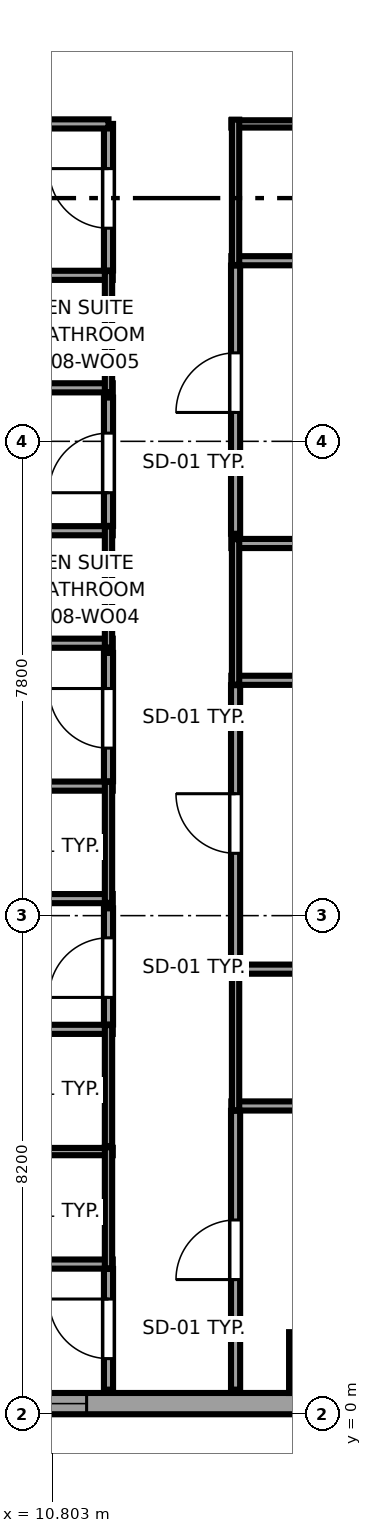
"""IFC4 building model, lengths in metres.
Left out: names, types, materials, properties, quantities, classifications, styles, units other than length and angle.
Written with IfcOpenShell. Run it as: python <this file> out.ifc"""

import sys

from ifc_helpers import new_model, si_unit, direction, frame, frame_2d, origin, origin_2d, place, context, subcontext, project, spatial, rectangle, extrude, source, transform, mapped, element, fill, save


model = new_model("IFC4")
c1 = context("Model", 3, precision=1e-05, world=origin(), true_north=direction((0.0, 1.0)))
c2 = subcontext(c1, "Body", "Model", "MODEL_VIEW")
j1 = project(units=[si_unit("LENGTHUNIT", "METRE"), si_unit("PLANEANGLEUNIT", "RADIAN")], contexts=[c1])
p1 = place(None, origin())
s1 = spatial("IfcSite", under=j1, at=p1, CompositionType="ELEMENT")
p2 = place(p1, origin())
s2 = spatial("IfcBuilding", under=s1, at=p2, CompositionType="ELEMENT")
p3 = place(p2, frame((0.0, 0.0, 39.1)))
s3 = spatial("IfcBuildingStorey", under=s2, at=p3, CompositionType="ELEMENT", Elevation=39.1)
m1 = source(origin(), c2, "Body", "SweptSolid", [
    extrude(rectangle(XDim=1.0, YDim=1.0, at=origin_2d()), origin(), (0.0, 0.0, 1.0), 3.55),
])
p4 = place(p3, frame((15.2, 0.85, 0.0), z_axis=(0.0, 0.0, 1.0), x_axis=(1.0, 0.0, 0.0)))
e1 = element("IfcColumn", 1, at=p4, inside=s3, PredefinedType="COLUMN", context=c2, shape_type="MappedRepresentation", body=[
    mapped(m1, transform((0.0, 0.0, 0.0), x_axis=(1.0, 0.0, 0.0), y_axis=(0.0, 1.0, 0.0), z_axis=(0.0, 0.0, 1.0), scale=1.0)),
])
p5 = place(p3, frame((4.617, 0.175, 0.0), z_axis=(0.0, 0.0, 1.0), x_axis=(1.0, 0.0, 0.0)))
e2 = element("IfcWall", 2, at=p5, inside=s3, PredefinedType="SOLIDWALL", context=c2, shape_type="SweptSolid", body=[
    extrude(rectangle(XDim=18.008, YDim=0.35, at=frame_2d((9.004, 0.0))), origin(), (0.0, 0.0, 1.0), 3.37),
])
p6 = place(p5, frame((4.953, 0.0, 0.68)))
e3 = element("IfcOpeningElement", 3, at=p6, cuts=e2, PredefinedType="OPENING", context=c2, shape_type="SweptSolid", body=[
    extrude(rectangle(XDim=1.8, YDim=1.85, at=frame_2d((0.9, 0.925))), frame((0.0, 0.185, 0.0), z_axis=(0.0, -1.0, 0.0), x_axis=(1.0, 0.0, 0.0)), (0.0, 0.0, 1.0), 0.37),
])
p7 = place(p5, frame((14.407, 0.0, 0.68)))
e4 = element("IfcOpeningElement", 4, at=p7, cuts=e2, PredefinedType="OPENING", context=c2, shape_type="SweptSolid", body=[
    extrude(rectangle(XDim=1.8, YDim=1.85, at=frame_2d((0.9, 0.925))), frame((0.0, 0.185, 0.0), z_axis=(0.0, -1.0, 0.0), x_axis=(1.0, 0.0, 0.0)), (0.0, 0.0, 1.0), 0.37),
])
p8 = place(p3, frame((9.21, 2.47, 0.0), z_axis=(0.0, 0.0, 1.0), x_axis=(1.0, 0.0, 0.0)))
e5 = element("IfcWall", 5, at=p8, inside=s3, PredefinedType="PARTITIONING", context=c2, shape_type="SweptSolid", body=[
    extrude(rectangle(XDim=2.59, YDim=0.15, at=frame_2d((1.295, 0.0))), origin(), (0.0, 0.0, 1.0), 3.37),
])
p9 = place(p3, frame((9.21, 4.32, 0.0), z_axis=(0.0, 0.0, 1.0), x_axis=(1.0, 0.0, 0.0)))
e6 = element("IfcWall", 6, at=p9, inside=s3, PredefinedType="PLUMBINGWALL", context=c2, shape_type="SweptSolid", body=[
    extrude(rectangle(XDim=2.59, YDim=0.12, at=frame_2d((1.295, 0.0))), origin(), (0.0, 0.0, 1.0), 3.37),
])
p10 = place(p3, frame((11.73, 2.4, 0.0), z_axis=(0.0, 0.0, 1.0), x_axis=(0.0, 1.0, 0.0)))
e7 = element("IfcWall", 7, at=p10, inside=s3, PredefinedType="PLUMBINGWALL", context=c2, shape_type="SweptSolid", body=[
    extrude(rectangle(XDim=1.99, YDim=0.12, at=frame_2d((0.995, 0.0))), origin(), (0.0, 0.0, 1.0), 3.37),
])
p11 = place(p3, frame((9.21, 6.33, 0.0), z_axis=(0.0, 0.0, 1.0), x_axis=(1.0, 0.0, 0.0)))
e8 = element("IfcWall", 8, at=p11, inside=s3, PredefinedType="PARTITIONING", context=c2, shape_type="SweptSolid", body=[
    extrude(rectangle(XDim=2.59, YDim=0.15, at=frame_2d((1.295, 0.0))), origin(), (0.0, 0.0, 1.0), 3.37),
])
p12 = place(p3, frame((11.73, 4.41, 0.0), z_axis=(0.0, 0.0, 1.0), x_axis=(0.0, 1.0, 0.0)))
e9 = element("IfcWall", 9, at=p12, inside=s3, PredefinedType="PLUMBINGWALL", context=c2, shape_type="SweptSolid", body=[
    extrude(rectangle(XDim=1.99, YDim=0.12, at=frame_2d((0.995, 0.0))), origin(), (0.0, 0.0, 1.0), 3.37),
])
p13 = place(p3, frame((0.405, 8.48, 0.0), z_axis=(0.0, 0.0, 1.0), x_axis=(1.0, 0.0, 0.0)))
e10 = element("IfcWall", 10, at=p13, inside=s3, PredefinedType="PARTITIONING", context=c2, shape_type="SweptSolid", body=[
    extrude(rectangle(XDim=11.395, YDim=0.15, at=frame_2d((5.698, 0.0))), origin(), (0.0, 0.0, 1.0), 3.37),
])
p14 = place(p3, frame((9.21, 10.33, 0.0), z_axis=(0.0, 0.0, 1.0), x_axis=(1.0, 0.0, 0.0)))
e11 = element("IfcWall", 11, at=p14, inside=s3, PredefinedType="PARTITIONING", context=c2, shape_type="SweptSolid", body=[
    extrude(rectangle(XDim=2.59, YDim=0.15, at=frame_2d((1.295, 0.0))), origin(), (0.0, 0.0, 1.0), 3.37),
])
p15 = place(p3, frame((11.73, 8.41, 0.0), z_axis=(0.0, 0.0, 1.0), x_axis=(0.0, 1.0, 0.0)))
e12 = element("IfcWall", 12, at=p15, inside=s3, PredefinedType="PLUMBINGWALL", context=c2, shape_type="SweptSolid", body=[
    extrude(rectangle(XDim=1.99, YDim=0.12, at=frame_2d((0.995, 0.0))), origin(), (0.0, 0.0, 1.0), 3.37),
])
p16 = place(p3, frame((0.405, 12.68, 0.0), z_axis=(0.0, 0.0, 1.0), x_axis=(1.0, 0.0, 0.0)))
e13 = element("IfcWall", 13, at=p16, inside=s3, PredefinedType="PARTITIONING", context=c2, shape_type="SweptSolid", body=[
    extrude(rectangle(XDim=11.395, YDim=0.15, at=frame_2d((5.698, 0.0))), origin(), (0.0, 0.0, 1.0), 3.37),
])
p17 = place(p3, frame((9.21, 14.53, 0.0), z_axis=(0.0, 0.0, 1.0), x_axis=(1.0, 0.0, 0.0)))
e14 = element("IfcWall", 14, at=p17, inside=s3, PredefinedType="PARTITIONING", context=c2, shape_type="SweptSolid", body=[
    extrude(rectangle(XDim=2.59, YDim=0.15, at=frame_2d((1.295, 0.0))), origin(), (0.0, 0.0, 1.0), 3.37),
])
p18 = place(p3, frame((11.73, 12.61, 0.0), z_axis=(0.0, 0.0, 1.0), x_axis=(0.0, 1.0, 0.0)))
e15 = element("IfcWall", 15, at=p18, inside=s3, PredefinedType="PLUMBINGWALL", context=c2, shape_type="SweptSolid", body=[
    extrude(rectangle(XDim=1.99, YDim=0.12, at=frame_2d((0.995, 0.0))), origin(), (0.0, 0.0, 1.0), 3.37),
])
p19 = place(p3, frame((0.405, 16.88, 0.0), z_axis=(0.0, 0.0, 1.0), x_axis=(1.0, 0.0, 0.0)))
e16 = element("IfcWall", 16, at=p19, inside=s3, PredefinedType="PARTITIONING", context=c2, shape_type="SweptSolid", body=[
    extrude(rectangle(XDim=11.395, YDim=0.15, at=frame_2d((5.698, 0.0))), origin(), (0.0, 0.0, 1.0), 3.37),
])
p20 = place(p3, frame((9.21, 18.73, 0.0), z_axis=(0.0, 0.0, 1.0), x_axis=(1.0, 0.0, 0.0)))
e17 = element("IfcWall", 17, at=p20, inside=s3, PredefinedType="PARTITIONING", context=c2, shape_type="SweptSolid", body=[
    extrude(rectangle(XDim=2.59, YDim=0.15, at=frame_2d((1.295, 0.0))), origin(), (0.0, 0.0, 1.0), 3.37),
])
p21 = place(p3, frame((11.73, 16.81, 0.0), z_axis=(0.0, 0.0, 1.0), x_axis=(0.0, 1.0, 0.0)))
e18 = element("IfcWall", 18, at=p21, inside=s3, PredefinedType="PLUMBINGWALL", context=c2, shape_type="SweptSolid", body=[
    extrude(rectangle(XDim=1.99, YDim=0.12, at=frame_2d((0.995, 0.0))), origin(), (0.0, 0.0, 1.0), 3.37),
])
for number, where, z_axis, x_axis in (
    (19, (13.75, 5.07, 0.0), (0.0, 0.0, 1.0), (1.0, 0.0, 0.0)),
    (20, (13.75, 7.32, 0.0), (0.0, 0.0, 1.0), (1.0, 0.0, 0.0)),
):
    element("IfcWall", number, at=place(p3, frame(where, z_axis=z_axis, x_axis=x_axis)), inside=s3, PredefinedType="PARTITIONING", context=c2, shape_type="SweptSolid", body=[
        extrude(rectangle(XDim=2.59, YDim=0.15, at=frame_2d((1.295, 0.0))), origin(), (0.0, 0.0, 1.0), 3.37),
    ])
p22 = place(p3, frame((13.82, 5.0, 0.0), z_axis=(0.0, 0.0, 1.0), x_axis=(0.0, 1.0, 0.0)))
e21 = element("IfcWall", 21, at=p22, inside=s3, PredefinedType="PLUMBINGWALL", context=c2, shape_type="SweptSolid", body=[
    extrude(rectangle(XDim=2.39, YDim=0.12, at=frame_2d((1.195, 0.0))), origin(), (0.0, 0.0, 1.0), 3.37),
])
for number, where, z_axis, x_axis in (
    (22, (13.75, 12.07, 0.0), (0.0, 0.0, 1.0), (1.0, 0.0, 0.0)),
    (23, (13.75, 14.32, 0.0), (0.0, 0.0, 1.0), (1.0, 0.0, 0.0)),
):
    element("IfcWall", number, at=place(p3, frame(where, z_axis=z_axis, x_axis=x_axis)), inside=s3, PredefinedType="PARTITIONING", context=c2, shape_type="SweptSolid", body=[
        extrude(rectangle(XDim=2.59, YDim=0.15, at=frame_2d((1.295, 0.0))), origin(), (0.0, 0.0, 1.0), 3.37),
    ])
p23 = place(p3, frame((13.82, 12.0, 0.0), z_axis=(0.0, 0.0, 1.0), x_axis=(0.0, 1.0, 0.0)))
e24 = element("IfcWall", 24, at=p23, inside=s3, PredefinedType="PLUMBINGWALL", context=c2, shape_type="SweptSolid", body=[
    extrude(rectangle(XDim=2.39, YDim=0.12, at=frame_2d((1.195, 0.0))), origin(), (0.0, 0.0, 1.0), 3.37),
])
p24 = place(p3, frame((13.75, 18.97, 0.0), z_axis=(0.0, 0.0, 1.0), x_axis=(1.0, 0.0, 0.0)))
e25 = element("IfcWall", 25, at=p24, inside=s3, PredefinedType="PARTITIONING", context=c2, shape_type="SweptSolid", body=[
    extrude(rectangle(XDim=2.59, YDim=0.15, at=frame_2d((1.295, 0.0))), origin(), (0.0, 0.0, 1.0), 3.37),
])
p25 = place(p3, frame((13.75, 21.22, 0.0), z_axis=(0.0, 0.0, 1.0), x_axis=(1.0, 0.0, 0.0)))
e26 = element("IfcWall", 26, at=p25, inside=s3, PredefinedType="PLUMBINGWALL", context=c2, shape_type="SweptSolid", body=[
    extrude(rectangle(XDim=2.59, YDim=0.12, at=frame_2d((1.295, 0.0))), origin(), (0.0, 0.0, 1.0), 3.37),
])
p26 = place(p3, frame((13.82, 18.9, 0.0), z_axis=(0.0, 0.0, 1.0), x_axis=(0.0, 1.0, 0.0)))
e27 = element("IfcWall", 27, at=p26, inside=s3, PredefinedType="PLUMBINGWALL", context=c2, shape_type="SweptSolid", body=[
    extrude(rectangle(XDim=2.39, YDim=0.12, at=frame_2d((1.195, 0.0))), origin(), (0.0, 0.0, 1.0), 3.37),
])
p27 = place(p3, frame((11.73, 0.405, 0.0), z_axis=(0.0, 0.0, 1.0), x_axis=(0.0, 1.0, 0.0)))
e28 = element("IfcWall", 28, at=p27, inside=s3, PredefinedType="PARTITIONING", context=c2, shape_type="SweptSolid", body=[
    extrude(rectangle(XDim=1.985, YDim=0.15, at=frame_2d((0.992, 0.0))), origin(), (0.0, 0.0, 1.0), 3.37),
])
p28 = place(p27, frame((0.51, 0.0, 0.0)))
e29 = element("IfcOpeningElement", 29, at=p28, cuts=e28, PredefinedType="OPENING", context=c2, shape_type="SweptSolid", body=[
    extrude(rectangle(XDim=0.98, YDim=2.12, at=frame_2d((0.49, 1.06))), frame((0.0, 0.085, 0.0), z_axis=(0.0, -1.0, 0.0), x_axis=(1.0, 0.0, 0.0)), (0.0, 0.0, 1.0), 0.17),
])
p29 = place(p3, frame((11.73, 6.41, 0.0), z_axis=(0.0, 0.0, 1.0), x_axis=(0.0, 1.0, 0.0)))
e30 = element("IfcWall", 30, at=p29, inside=s3, PredefinedType="PARTITIONING", context=c2, shape_type="SweptSolid", body=[
    extrude(rectangle(XDim=1.91, YDim=0.15, at=frame_2d((0.955, 0.0))), origin(), (0.0, 0.0, 1.0), 3.37),
])
p30 = place(p29, frame((0.445, 0.0, 0.0)))
e31 = element("IfcOpeningElement", 31, at=p30, cuts=e30, PredefinedType="OPENING", context=c2, shape_type="SweptSolid", body=[
    extrude(rectangle(XDim=0.98, YDim=2.12, at=frame_2d((0.49, 1.06))), frame((0.0, 0.085, 0.0), z_axis=(0.0, -1.0, 0.0), x_axis=(1.0, 0.0, 0.0)), (0.0, 0.0, 1.0), 0.17),
])
p31 = place(p3, frame((11.73, 10.41, 0.0), z_axis=(0.0, 0.0, 1.0), x_axis=(0.0, 1.0, 0.0)))
e32 = element("IfcWall", 32, at=p31, inside=s3, PredefinedType="PARTITIONING", context=c2, shape_type="SweptSolid", body=[
    extrude(rectangle(XDim=2.11, YDim=0.15, at=frame_2d((1.055, 0.0))), origin(), (0.0, 0.0, 1.0), 3.37),
])
p32 = place(p31, frame((0.545, 0.0, 0.0)))
e33 = element("IfcOpeningElement", 33, at=p32, cuts=e32, PredefinedType="OPENING", context=c2, shape_type="SweptSolid", body=[
    extrude(rectangle(XDim=0.98, YDim=2.12, at=frame_2d((0.49, 1.06))), frame((0.0, 0.085, 0.0), z_axis=(0.0, -1.0, 0.0), x_axis=(1.0, 0.0, 0.0)), (0.0, 0.0, 1.0), 0.17),
])
p33 = place(p3, frame((11.73, 14.61, 0.0), z_axis=(0.0, 0.0, 1.0), x_axis=(0.0, 1.0, 0.0)))
e34 = element("IfcWall", 34, at=p33, inside=s3, PredefinedType="PARTITIONING", context=c2, shape_type="SweptSolid", body=[
    extrude(rectangle(XDim=2.11, YDim=0.15, at=frame_2d((1.055, 0.0))), origin(), (0.0, 0.0, 1.0), 3.37),
])
p34 = place(p33, frame((0.545, 0.0, 0.0)))
e35 = element("IfcOpeningElement", 35, at=p34, cuts=e34, PredefinedType="OPENING", context=c2, shape_type="SweptSolid", body=[
    extrude(rectangle(XDim=0.98, YDim=2.12, at=frame_2d((0.49, 1.06))), frame((0.0, 0.085, 0.0), z_axis=(0.0, -1.0, 0.0), x_axis=(1.0, 0.0, 0.0)), (0.0, 0.0, 1.0), 0.17),
])
p35 = place(p3, frame((11.73, 18.81, 0.0), z_axis=(0.0, 0.0, 1.0), x_axis=(0.0, 1.0, 0.0)))
e36 = element("IfcWall", 36, at=p35, inside=s3, PredefinedType="PARTITIONING", context=c2, shape_type="SweptSolid", body=[
    extrude(rectangle(XDim=2.41, YDim=0.15, at=frame_2d((1.205, 0.0))), origin(), (0.0, 0.0, 1.0), 3.37),
])
p36 = place(p35, frame((0.695, 0.0, 0.0)))
e37 = element("IfcOpeningElement", 37, at=p36, cuts=e36, PredefinedType="OPENING", context=c2, shape_type="SweptSolid", body=[
    extrude(rectangle(XDim=0.98, YDim=2.12, at=frame_2d((0.49, 1.06))), frame((0.0, 0.085, 0.0), z_axis=(0.0, -1.0, 0.0), x_axis=(1.0, 0.0, 0.0)), (0.0, 0.0, 1.0), 0.17),
])
p37 = place(p3, frame((0.405, 21.22, 0.0), z_axis=(0.0, 0.0, 1.0), x_axis=(1.0, 0.0, 0.0)))
e38 = element("IfcWall", 38, at=p37, inside=s3, PredefinedType="PARTITIONING", context=c2, shape_type="SweptSolid", body=[
    extrude(rectangle(XDim=11.325, YDim=0.15, at=frame_2d((5.663, 0.0))), origin(), (0.0, 0.0, 1.0), 3.37),
])
p38 = place(p3, frame((13.82, 0.405, 0.0), z_axis=(0.0, 0.0, 1.0), x_axis=(0.0, 1.0, 0.0)))
e39 = element("IfcWall", 39, at=p38, inside=s3, PredefinedType="PARTITIONING", context=c2, shape_type="SweptSolid", body=[
    extrude(rectangle(XDim=4.585, YDim=0.15, at=frame_2d((2.292, 0.0))), origin(), (0.0, 0.0, 1.0), 3.37),
])
p39 = place(p38, frame((1.81, 0.0, 0.0)))
e40 = element("IfcOpeningElement", 40, at=p39, cuts=e39, PredefinedType="OPENING", context=c2, shape_type="SweptSolid", body=[
    extrude(rectangle(XDim=0.98, YDim=2.12, at=frame_2d((0.49, 1.06))), frame((0.0, 0.085, 0.0), z_axis=(0.0, -1.0, 0.0), x_axis=(1.0, 0.0, 0.0)), (0.0, 0.0, 1.0), 0.17),
])
p40 = place(p3, frame((13.82, 7.48, 0.0), z_axis=(0.0, 0.0, 1.0), x_axis=(0.0, 1.0, 0.0)))
e41 = element("IfcWall", 41, at=p40, inside=s3, PredefinedType="PARTITIONING", context=c2, shape_type="SweptSolid", body=[
    extrude(rectangle(XDim=4.51, YDim=0.15, at=frame_2d((2.255, 0.0))), origin(), (0.0, 0.0, 1.0), 3.37),
])
p41 = place(p40, frame((1.745, 0.0, 0.0)))
e42 = element("IfcOpeningElement", 42, at=p41, cuts=e41, PredefinedType="OPENING", context=c2, shape_type="SweptSolid", body=[
    extrude(rectangle(XDim=0.98, YDim=2.12, at=frame_2d((0.49, 1.06))), frame((0.0, 0.085, 0.0), z_axis=(0.0, -1.0, 0.0), x_axis=(1.0, 0.0, 0.0)), (0.0, 0.0, 1.0), 0.17),
])
p42 = place(p3, frame((13.82, 14.48, 0.0), z_axis=(0.0, 0.0, 1.0), x_axis=(0.0, 1.0, 0.0)))
e43 = element("IfcWall", 43, at=p42, inside=s3, PredefinedType="PARTITIONING", context=c2, shape_type="SweptSolid", body=[
    extrude(rectangle(XDim=4.41, YDim=0.15, at=frame_2d((2.205, 0.0))), origin(), (0.0, 0.0, 1.0), 3.37),
])
p43 = place(p42, frame((1.995, 0.0, 0.0)))
e44 = element("IfcOpeningElement", 44, at=p43, cuts=e43, PredefinedType="OPENING", context=c2, shape_type="SweptSolid", body=[
    extrude(rectangle(XDim=0.98, YDim=2.12, at=frame_2d((0.49, 1.06))), frame((0.0, 0.085, 0.0), z_axis=(0.0, -1.0, 0.0), x_axis=(1.0, 0.0, 0.0)), (0.0, 0.0, 1.0), 0.17),
])
m2 = source(origin(), c2, "Body", "SweptSolid", [
    extrude(rectangle(XDim=1.8, YDim=1.85, at=frame_2d((0.9, 0.925))), frame((0.0, 0.09, 0.0), z_axis=(0.0, -1.0, 0.0), x_axis=(1.0, 0.0, 0.0)), (0.0, 0.0, 1.0), 0.06),
])
p44 = place(p6, origin())
e45 = element("IfcWindow", 45, at=p44, inside=s3, PartitioningType="TRIPLE_PANEL_HORIZONTAL", PredefinedType="WINDOW", context=c2, shape_type="MappedRepresentation", body=[
    mapped(m2, transform((0.0, 0.0, 0.0), x_axis=(1.0, 0.0, 0.0), y_axis=(0.0, 1.0, 0.0), z_axis=(0.0, 0.0, 1.0), scale=1.0)),
])
fill(e3, e45)
m3 = source(origin(), c2, "Body", "SweptSolid", [
    extrude(rectangle(XDim=0.98, YDim=2.12, at=frame_2d((0.49, 1.06))), frame((0.0, 0.025, 0.0), z_axis=(0.0, -1.0, 0.0), x_axis=(1.0, 0.0, 0.0)), (0.0, 0.0, 1.0), 0.05),
])
p45 = place(p28, origin())
e46 = element("IfcDoor", 46, at=p45, inside=s3, OperationType="SINGLE_SWING_RIGHT", PredefinedType="DOOR", context=c2, shape_type="MappedRepresentation", body=[
    mapped(m3, transform((0.0, 0.0, 0.0), x_axis=(1.0, 0.0, 0.0), y_axis=(0.0, 1.0, 0.0), z_axis=(0.0, 0.0, 1.0), scale=1.0)),
])
fill(e29, e46)
p46 = place(p30, origin())
e47 = element("IfcDoor", 47, at=p46, inside=s3, OperationType="SINGLE_SWING_LEFT", PredefinedType="DOOR", context=c2, shape_type="MappedRepresentation", body=[
    mapped(m3, transform((0.0, 0.0, 0.0), x_axis=(1.0, 0.0, 0.0), y_axis=(0.0, 1.0, 0.0), z_axis=(0.0, 0.0, 1.0), scale=1.0)),
])
fill(e31, e47)
p47 = place(p32, origin())
e48 = element("IfcDoor", 48, at=p47, inside=s3, OperationType="SINGLE_SWING_RIGHT", PredefinedType="DOOR", context=c2, shape_type="MappedRepresentation", body=[
    mapped(m3, transform((0.0, 0.0, 0.0), x_axis=(1.0, 0.0, 0.0), y_axis=(0.0, 1.0, 0.0), z_axis=(0.0, 0.0, 1.0), scale=1.0)),
])
fill(e33, e48)
p48 = place(p34, origin())
e49 = element("IfcDoor", 49, at=p48, inside=s3, OperationType="SINGLE_SWING_LEFT", PredefinedType="DOOR", context=c2, shape_type="MappedRepresentation", body=[
    mapped(m3, transform((0.0, 0.0, 0.0), x_axis=(1.0, 0.0, 0.0), y_axis=(0.0, 1.0, 0.0), z_axis=(0.0, 0.0, 1.0), scale=1.0)),
])
fill(e35, e49)
p49 = place(p36, origin())
e50 = element("IfcDoor", 50, at=p49, inside=s3, OperationType="SINGLE_SWING_RIGHT", PredefinedType="DOOR", context=c2, shape_type="MappedRepresentation", body=[
    mapped(m3, transform((0.0, 0.0, 0.0), x_axis=(1.0, 0.0, 0.0), y_axis=(0.0, 1.0, 0.0), z_axis=(0.0, 0.0, 1.0), scale=1.0)),
])
fill(e37, e50)
p50 = place(p39, origin())
e51 = element("IfcDoor", 51, at=p50, inside=s3, OperationType="SINGLE_SWING_LEFT", PredefinedType="DOOR", context=c2, shape_type="MappedRepresentation", body=[
    mapped(m3, transform((0.0, 0.0, 0.0), x_axis=(1.0, 0.0, 0.0), y_axis=(0.0, 1.0, 0.0), z_axis=(0.0, 0.0, 1.0), scale=1.0)),
])
fill(e40, e51)
p51 = place(p41, origin())
e52 = element("IfcDoor", 52, at=p51, inside=s3, OperationType="SINGLE_SWING_RIGHT", PredefinedType="DOOR", context=c2, shape_type="MappedRepresentation", body=[
    mapped(m3, transform((0.0, 0.0, 0.0), x_axis=(1.0, 0.0, 0.0), y_axis=(0.0, 1.0, 0.0), z_axis=(0.0, 0.0, 1.0), scale=1.0)),
])
fill(e42, e52)
p52 = place(p43, origin())
e53 = element("IfcDoor", 53, at=p52, inside=s3, OperationType="SINGLE_SWING_LEFT", PredefinedType="DOOR", context=c2, shape_type="MappedRepresentation", body=[
    mapped(m3, transform((0.0, 0.0, 0.0), x_axis=(1.0, 0.0, 0.0), y_axis=(0.0, 1.0, 0.0), z_axis=(0.0, 0.0, 1.0), scale=1.0)),
])
fill(e44, e53)
save(model, sys.argv[1])
